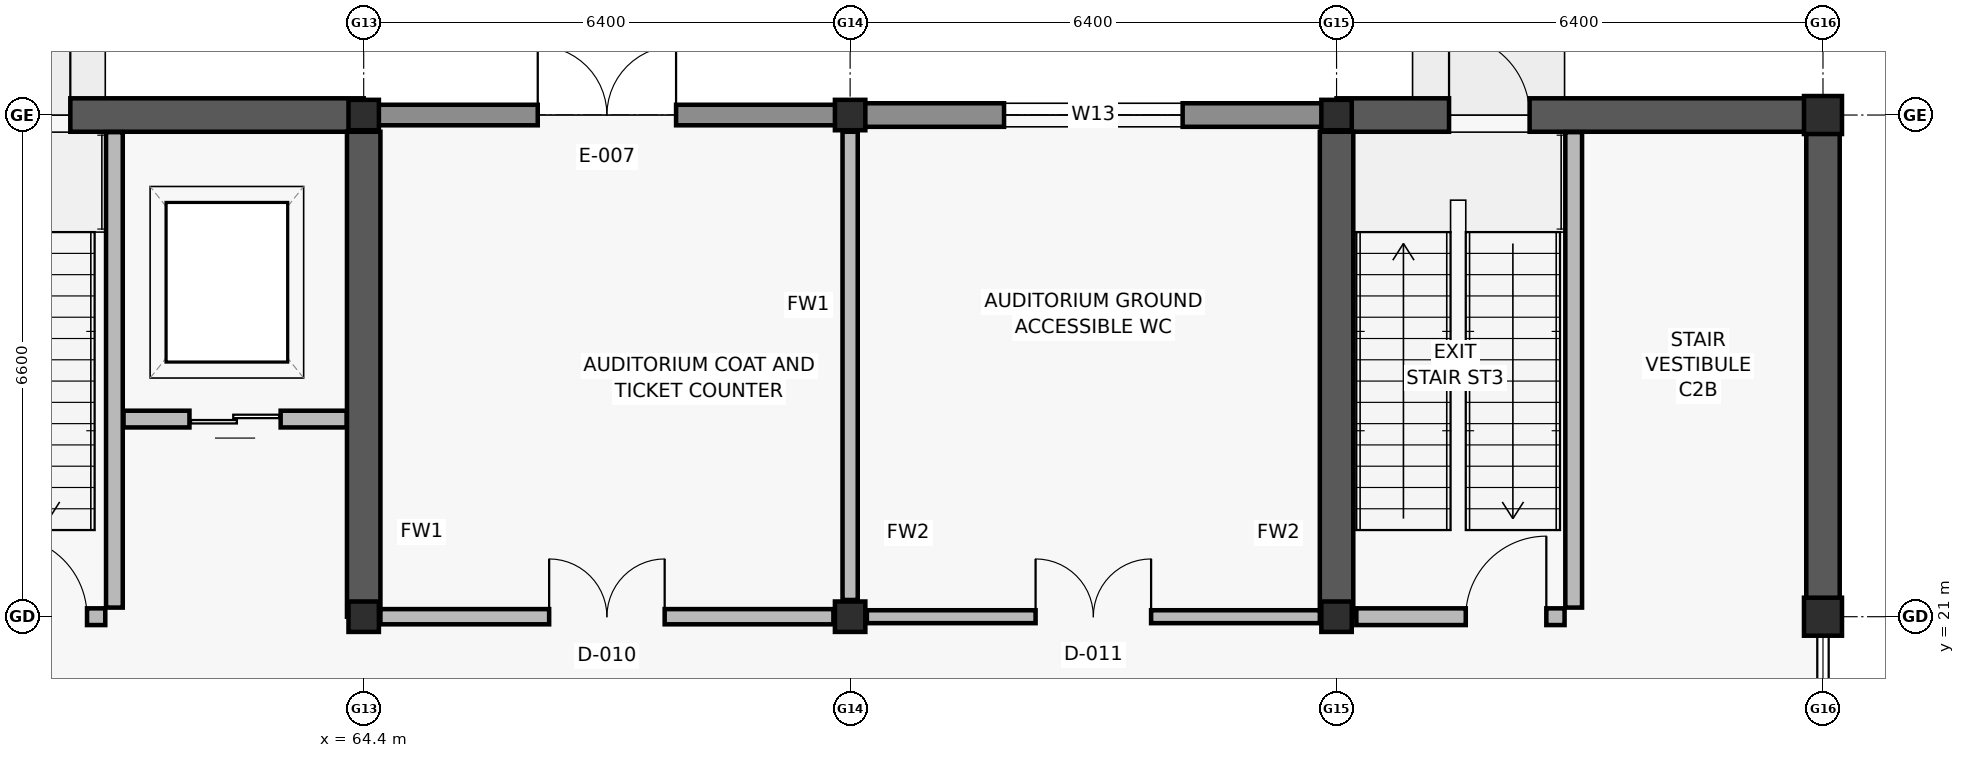
"""IFC4 building model, lengths in metres.
Left out: names, types, materials, properties, quantities, classifications, styles, units other than length and angle.
Written with IfcOpenShell. Run it as: python <this file> out.ifc"""

import sys

from ifc_helpers import new_model, si_unit, direction, frame, frame_2d, origin, origin_2d, place, context, subcontext, project, spatial, rectangle, i_section, extrude, element, fill, save


model = new_model("IFC4")
c1 = context("Model", 3, precision=1e-05, world=origin(), true_north=direction((0.0, 1.0)))
c2 = subcontext(c1, "Body", "Model", "MODEL_VIEW")
j1 = project(units=[si_unit("LENGTHUNIT", "METRE"), si_unit("PLANEANGLEUNIT", "RADIAN")], contexts=[c1])
p1 = place(None, origin())
s1 = spatial("IfcSite", under=j1, at=p1, CompositionType="ELEMENT")
p2 = place(p1, origin())
s2 = spatial("IfcBuilding", under=s1, at=p2, CompositionType="ELEMENT")
p3 = place(p2, origin())
s3 = spatial("IfcBuildingStorey", under=s2, at=p3, CompositionType="ELEMENT", Elevation=0.0)
for number, where, z_axis, x_axis in (
    (1, (64.4, 21.0, 0.0), (0.0, 0.0, 1.0), (1.0, 0.0, 0.0)),
    (2, (64.4, 27.6, 0.0), (0.0, 0.0, 1.0), (1.0, 0.0, 0.0)),
    (3, (70.8, 21.0, 0.0), (0.0, 0.0, 1.0), (1.0, 0.0, 0.0)),
    (4, (70.8, 27.6, 0.0), (0.0, 0.0, 1.0), (1.0, 0.0, 0.0)),
    (5, (77.2, 21.0, 0.0), (0.0, 0.0, 1.0), (1.0, 0.0, 0.0)),
    (6, (77.2, 27.6, 0.0), (0.0, 0.0, 1.0), (1.0, 0.0, 0.0)),
):
    element("IfcColumn", number, at=place(p3, frame(where, z_axis=z_axis, x_axis=x_axis)), inside=s3, PredefinedType="COLUMN", context=c2, shape_type="SweptSolid", body=[
        extrude(i_section(OverallWidth=0.4, OverallDepth=0.4, WebThickness=0.02, FlangeThickness=0.032, at=origin_2d()), origin(), (0.0, 0.0, 1.0), 5.4),
    ])
for number, where, z_axis, x_axis in (
    (7, (83.6, 21.0, 0.0), (0.0, 0.0, 1.0), (1.0, 0.0, 0.0)),
    (8, (83.6, 27.6, 0.0), (0.0, 0.0, 1.0), (1.0, 0.0, 0.0)),
):
    element("IfcColumn", number, at=place(p3, frame(where, z_axis=z_axis, x_axis=x_axis)), inside=s3, PredefinedType="COLUMN", context=c2, shape_type="SweptSolid", body=[
        extrude(i_section(OverallWidth=0.5, OverallDepth=0.5, WebThickness=0.02, FlangeThickness=0.036, at=origin_2d()), origin(), (0.0, 0.0, 1.0), 5.4),
    ])
p4 = place(p3, frame((58.0, 27.6, 0.0), z_axis=(0.0, 0.0, 1.0), x_axis=(1.0, 0.0, 0.0)))
e9 = element("IfcWall", 9, at=p4, inside=s3, PredefinedType="SHEAR", context=c2, shape_type="SweptSolid", body=[
    extrude(rectangle(XDim=6.4, YDim=0.44, at=frame_2d((3.2, 0.0))), origin(), (0.0, 0.0, 1.0), 5.16),
])
p5 = place(p4, frame((1.48, 0.0, 0.0)))
e10 = element("IfcOpeningElement", 10, at=p5, cuts=e9, PredefinedType="OPENING", context=c2, shape_type="SweptSolid", body=[
    extrude(rectangle(XDim=1.06, YDim=2.12, at=frame_2d((0.53, 1.06))), frame((0.0, 0.23, 0.0), z_axis=(0.0, -1.0, 0.0), x_axis=(1.0, 0.0, 0.0)), (0.0, 0.0, 1.0), 0.46),
])
p6 = place(p3, frame((64.4, 21.0, 0.0), z_axis=(0.0, 0.0, 1.0), x_axis=(0.0, 1.0, 0.0)))
e11 = element("IfcWall", 11, at=p6, inside=s3, PredefinedType="SHEAR", context=c2, shape_type="SweptSolid", body=[
    extrude(rectangle(XDim=6.38, YDim=0.44, at=frame_2d((3.19, 0.0))), origin(), (0.0, 0.0, 1.0), 5.16),
])
p7 = place(p3, frame((77.2, 27.6, 0.0), z_axis=(0.0, 0.0, 1.0), x_axis=(1.0, 0.0, 0.0)))
e12 = element("IfcWall", 12, at=p7, inside=s3, PredefinedType="SHEAR", context=c2, shape_type="SweptSolid", body=[
    extrude(rectangle(XDim=6.4, YDim=0.44, at=frame_2d((3.2, 0.0))), origin(), (0.0, 0.0, 1.0), 5.16),
])
p8 = place(p7, frame((1.48, 0.0, 0.0)))
e13 = element("IfcOpeningElement", 13, at=p8, cuts=e12, PredefinedType="OPENING", context=c2, shape_type="SweptSolid", body=[
    extrude(rectangle(XDim=1.06, YDim=2.12, at=frame_2d((0.53, 1.06))), frame((0.0, 0.23, 0.0), z_axis=(0.0, -1.0, 0.0), x_axis=(1.0, 0.0, 0.0)), (0.0, 0.0, 1.0), 0.46),
])
for number, where, z_axis, x_axis in (
    (14, (77.2, 21.0, 0.0), (0.0, 0.0, 1.0), (0.0, 1.0, 0.0)),
    (15, (83.6, 21.0, 0.0), (0.0, 0.0, 1.0), (0.0, 1.0, 0.0)),
):
    element("IfcWall", number, at=place(p3, frame(where, z_axis=z_axis, x_axis=x_axis)), inside=s3, PredefinedType="SHEAR", context=c2, shape_type="SweptSolid", body=[
        extrude(rectangle(XDim=6.38, YDim=0.44, at=frame_2d((3.19, 0.0))), origin(), (0.0, 0.0, 1.0), 5.16),
    ])
p9 = place(p3, frame((64.405, 27.6, 0.0), z_axis=(0.0, 0.0, 1.0), x_axis=(1.0, 0.0, 0.0)))
e16 = element("IfcWall", 16, at=p9, inside=s3, PredefinedType="SOLIDWALL", context=c2, shape_type="SweptSolid", body=[
    extrude(rectangle(XDim=6.39, YDim=0.27, at=frame_2d((3.195, 0.0))), origin(), (0.0, 0.0, 1.0), 4.52),
])
p10 = place(p9, frame((2.285, 0.0, 0.0)))
e17 = element("IfcOpeningElement", 17, at=p10, cuts=e16, PredefinedType="OPENING", context=c2, shape_type="SweptSolid", body=[
    extrude(rectangle(XDim=1.82, YDim=2.2, at=frame_2d((0.91, 1.1))), frame((0.0, 0.145, 0.0), z_axis=(0.0, -1.0, 0.0), x_axis=(1.0, 0.0, 0.0)), (0.0, 0.0, 1.0), 0.29),
])
p11 = place(p3, frame((70.805, 27.6, 0.0), z_axis=(0.0, 0.0, 1.0), x_axis=(1.0, 0.0, 0.0)))
e18 = element("IfcWall", 18, at=p11, inside=s3, PredefinedType="SOLIDWALL", context=c2, shape_type="SweptSolid", body=[
    extrude(rectangle(XDim=6.39, YDim=0.31, at=frame_2d((3.195, 0.0))), origin(), (0.0, 0.0, 1.0), 4.52),
])
p12 = place(p11, frame((2.02, 0.0, 0.8)))
e19 = element("IfcOpeningElement", 19, at=p12, cuts=e18, PredefinedType="OPENING", context=c2, shape_type="SweptSolid", body=[
    extrude(rectangle(XDim=2.35, YDim=1.8, at=frame_2d((1.175, 0.9))), frame((0.0, 0.165, 0.0), z_axis=(0.0, -1.0, 0.0), x_axis=(1.0, 0.0, 0.0)), (0.0, 0.0, 1.0), 0.33),
])
p13 = place(p3, frame((61.12, 21.12, 0.0), z_axis=(0.0, 0.0, 1.0), x_axis=(0.0, 1.0, 0.0)))
e20 = element("IfcWall", 20, at=p13, inside=s3, PredefinedType="SOLIDWALL", context=c2, shape_type="SweptSolid", body=[
    extrude(rectangle(XDim=6.255, YDim=0.22, at=frame_2d((3.127, 0.0))), origin(), (0.0, 0.0, 1.0), 5.16),
])
p14 = place(p3, frame((58.26, 21.0, 0.0), z_axis=(0.0, 0.0, 1.0), x_axis=(1.0, 0.0, 0.0)))
e21 = element("IfcWall", 21, at=p14, inside=s3, PredefinedType="SOLIDWALL", context=c2, shape_type="SweptSolid", body=[
    extrude(rectangle(XDim=2.74, YDim=0.22, at=frame_2d((1.37, 0.0))), origin(), (0.0, 0.0, 1.0), 4.52),
])
p15 = place(p14, frame((1.44, 0.0, 0.0)))
e22 = element("IfcOpeningElement", 22, at=p15, cuts=e21, PredefinedType="OPENING", context=c2, shape_type="SweptSolid", body=[
    extrude(rectangle(XDim=1.06, YDim=2.1, at=frame_2d((0.53, 1.05))), frame((0.0, 0.12, 0.0), z_axis=(0.0, -1.0, 0.0), x_axis=(1.0, 0.0, 0.0)), (0.0, 0.0, 1.0), 0.24),
])
p16 = place(p3, frame((61.24, 23.6, 0.0), z_axis=(0.0, 0.0, 1.0), x_axis=(1.0, 0.0, 0.0)))
e23 = element("IfcWall", 23, at=p16, inside=s3, PredefinedType="SOLIDWALL", context=c2, shape_type="SweptSolid", body=[
    extrude(rectangle(XDim=2.935, YDim=0.22, at=frame_2d((1.468, 0.0))), origin(), (0.0, 0.0, 1.0), 5.16),
])
p17 = place(p16, frame((0.867, 0.0, 0.0)))
e24 = element("IfcOpeningElement", 24, at=p17, cuts=e23, PredefinedType="OPENING", context=c2, shape_type="SweptSolid", body=[
    extrude(rectangle(XDim=1.2, YDim=2.15, at=frame_2d((0.6, 1.075))), frame((0.0, 0.12, 0.0), z_axis=(0.0, -1.0, 0.0), x_axis=(1.0, 0.0, 0.0)), (0.0, 0.0, 1.0), 0.24),
])
p18 = place(p3, frame((80.32, 21.12, 0.0), z_axis=(0.0, 0.0, 1.0), x_axis=(0.0, 1.0, 0.0)))
e25 = element("IfcWall", 25, at=p18, inside=s3, PredefinedType="SOLIDWALL", context=c2, shape_type="SweptSolid", body=[
    extrude(rectangle(XDim=6.255, YDim=0.22, at=frame_2d((3.127, 0.0))), origin(), (0.0, 0.0, 1.0), 5.16),
])
p19 = place(p3, frame((77.46, 21.0, 0.0), z_axis=(0.0, 0.0, 1.0), x_axis=(1.0, 0.0, 0.0)))
e26 = element("IfcWall", 26, at=p19, inside=s3, PredefinedType="SOLIDWALL", context=c2, shape_type="SweptSolid", body=[
    extrude(rectangle(XDim=2.74, YDim=0.22, at=frame_2d((1.37, 0.0))), origin(), (0.0, 0.0, 1.0), 4.52),
])
p20 = place(p19, frame((1.44, 0.0, 0.0)))
e27 = element("IfcOpeningElement", 27, at=p20, cuts=e26, PredefinedType="OPENING", context=c2, shape_type="SweptSolid", body=[
    extrude(rectangle(XDim=1.06, YDim=2.1, at=frame_2d((0.53, 1.05))), frame((0.0, 0.12, 0.0), z_axis=(0.0, -1.0, 0.0), x_axis=(1.0, 0.0, 0.0)), (0.0, 0.0, 1.0), 0.24),
])
p21 = place(p3, frame((64.62, 21.0, 0.0), z_axis=(0.0, 0.0, 1.0), x_axis=(1.0, 0.0, 0.0)))
e28 = element("IfcWall", 28, at=p21, inside=s3, PredefinedType="PARTITIONING", context=c2, shape_type="SweptSolid", body=[
    extrude(rectangle(XDim=5.96, YDim=0.2, at=frame_2d((2.98, 0.0))), origin(), (0.0, 0.0, 1.0), 4.5),
])
p22 = place(p21, frame((2.22, 0.0, 0.0)))
e29 = element("IfcOpeningElement", 29, at=p22, cuts=e28, PredefinedType="OPENING", context=c2, shape_type="SweptSolid", body=[
    extrude(rectangle(XDim=1.52, YDim=2.15, at=frame_2d((0.76, 1.075))), frame((0.0, 0.11, 0.0), z_axis=(0.0, -1.0, 0.0), x_axis=(1.0, 0.0, 0.0)), (0.0, 0.0, 1.0), 0.22),
])
p23 = place(p3, frame((71.02, 21.0, 0.0), z_axis=(0.0, 0.0, 1.0), x_axis=(1.0, 0.0, 0.0)))
e30 = element("IfcWall", 30, at=p23, inside=s3, PredefinedType="PARTITIONING", context=c2, shape_type="SweptSolid", body=[
    extrude(rectangle(XDim=5.96, YDim=0.17, at=frame_2d((2.98, 0.0))), origin(), (0.0, 0.0, 1.0), 4.5),
])
p24 = place(p23, frame((2.22, 0.0, 0.0)))
e31 = element("IfcOpeningElement", 31, at=p24, cuts=e30, PredefinedType="OPENING", context=c2, shape_type="SweptSolid", body=[
    extrude(rectangle(XDim=1.52, YDim=2.15, at=frame_2d((0.76, 1.075))), frame((0.0, 0.095, 0.0), z_axis=(0.0, -1.0, 0.0), x_axis=(1.0, 0.0, 0.0)), (0.0, 0.0, 1.0), 0.19),
])
p25 = place(p3, frame((70.8, 21.22, 0.0), z_axis=(0.0, 0.0, 1.0), x_axis=(0.0, 1.0, 0.0)))
e32 = element("IfcWall", 32, at=p25, inside=s3, PredefinedType="PARTITIONING", context=c2, shape_type="SweptSolid", body=[
    extrude(rectangle(XDim=6.16, YDim=0.2, at=frame_2d((3.08, 0.0))), origin(), (0.0, 0.0, 1.0), 4.5),
])
p26 = place(p10, origin())
e33 = element("IfcDoor", 33, at=p26, inside=s3, OperationType="DOUBLE_DOOR_SINGLE_SWING", PredefinedType="DOOR", context=c2, shape_type="SweptSolid", body=[
    extrude(rectangle(XDim=1.82, YDim=2.2, at=frame_2d((0.91, 1.1))), frame((0.0, 0.025, 0.0), z_axis=(0.0, -1.0, 0.0), x_axis=(1.0, 0.0, 0.0)), (0.0, 0.0, 1.0), 0.05),
])
fill(e17, e33)
p27 = place(p12, origin())
e34 = element("IfcWindow", 34, at=p27, inside=s3, PartitioningType="DOUBLE_PANEL_VERTICAL", PredefinedType="WINDOW", context=c2, shape_type="SweptSolid", body=[
    extrude(rectangle(XDim=2.35, YDim=1.8, at=frame_2d((1.175, 0.9))), frame((0.0, 0.03, 0.0), z_axis=(0.0, -1.0, 0.0), x_axis=(1.0, 0.0, 0.0)), (0.0, 0.0, 1.0), 0.06),
])
fill(e19, e34)
p28 = place(p15, origin())
e35 = element("IfcDoor", 35, at=p28, inside=s3, OperationType="SINGLE_SWING_LEFT", PredefinedType="DOOR", context=c2, shape_type="SweptSolid", body=[
    extrude(rectangle(XDim=1.06, YDim=2.1, at=frame_2d((0.53, 1.05))), frame((0.0, 0.025, 0.0), z_axis=(0.0, -1.0, 0.0), x_axis=(1.0, 0.0, 0.0)), (0.0, 0.0, 1.0), 0.05),
])
fill(e22, e35)
p29 = place(p5, origin())
e36 = element("IfcDoor", 36, at=p29, inside=s3, OperationType="SINGLE_SWING_RIGHT", PredefinedType="DOOR", context=c2, shape_type="SweptSolid", body=[
    extrude(rectangle(XDim=1.06, YDim=2.12, at=frame_2d((0.53, 1.06))), frame((0.0, 0.025, 0.0), z_axis=(0.0, -1.0, 0.0), x_axis=(1.0, 0.0, 0.0)), (0.0, 0.0, 1.0), 0.05),
])
fill(e10, e36)
p30 = place(p17, origin())
e37 = element("IfcDoor", 37, at=p30, inside=s3, OperationType="DOUBLE_DOOR_SLIDING", PredefinedType="DOOR", context=c2, shape_type="SweptSolid", body=[
    extrude(rectangle(XDim=1.2, YDim=2.15, at=frame_2d((0.6, 1.075))), frame((0.0, 0.025, 0.0), z_axis=(0.0, -1.0, 0.0), x_axis=(1.0, 0.0, 0.0)), (0.0, 0.0, 1.0), 0.05),
])
fill(e24, e37)
p31 = place(p20, origin())
e38 = element("IfcDoor", 38, at=p31, inside=s3, OperationType="SINGLE_SWING_RIGHT", PredefinedType="DOOR", context=c2, shape_type="SweptSolid", body=[
    extrude(rectangle(XDim=1.06, YDim=2.1, at=frame_2d((0.53, 1.05))), frame((0.0, 0.025, 0.0), z_axis=(0.0, -1.0, 0.0), x_axis=(1.0, 0.0, 0.0)), (0.0, 0.0, 1.0), 0.05),
])
fill(e27, e38)
p32 = place(p8, origin())
e39 = element("IfcDoor", 39, at=p32, inside=s3, OperationType="SINGLE_SWING_LEFT", PredefinedType="DOOR", context=c2, shape_type="SweptSolid", body=[
    extrude(rectangle(XDim=1.06, YDim=2.12, at=frame_2d((0.53, 1.06))), frame((0.0, 0.025, 0.0), z_axis=(0.0, -1.0, 0.0), x_axis=(1.0, 0.0, 0.0)), (0.0, 0.0, 1.0), 0.05),
])
fill(e13, e39)
p33 = place(p22, origin())
e40 = element("IfcDoor", 40, at=p33, inside=s3, OperationType="DOUBLE_DOOR_SINGLE_SWING", PredefinedType="DOOR", context=c2, shape_type="SweptSolid", body=[
    extrude(rectangle(XDim=1.52, YDim=2.15, at=frame_2d((0.76, 1.075))), frame((0.0, 0.025, 0.0), z_axis=(0.0, -1.0, 0.0), x_axis=(1.0, 0.0, 0.0)), (0.0, 0.0, 1.0), 0.05),
])
fill(e29, e40)
p34 = place(p24, origin())
e41 = element("IfcDoor", 41, at=p34, inside=s3, OperationType="DOUBLE_DOOR_SINGLE_SWING", PredefinedType="DOOR", context=c2, shape_type="SweptSolid", body=[
    extrude(rectangle(XDim=1.52, YDim=2.15, at=frame_2d((0.76, 1.075))), frame((0.0, 0.025, 0.0), z_axis=(0.0, -1.0, 0.0), x_axis=(1.0, 0.0, 0.0)), (0.0, 0.0, 1.0), 0.05),
])
fill(e31, e41)
save(model, sys.argv[1])
